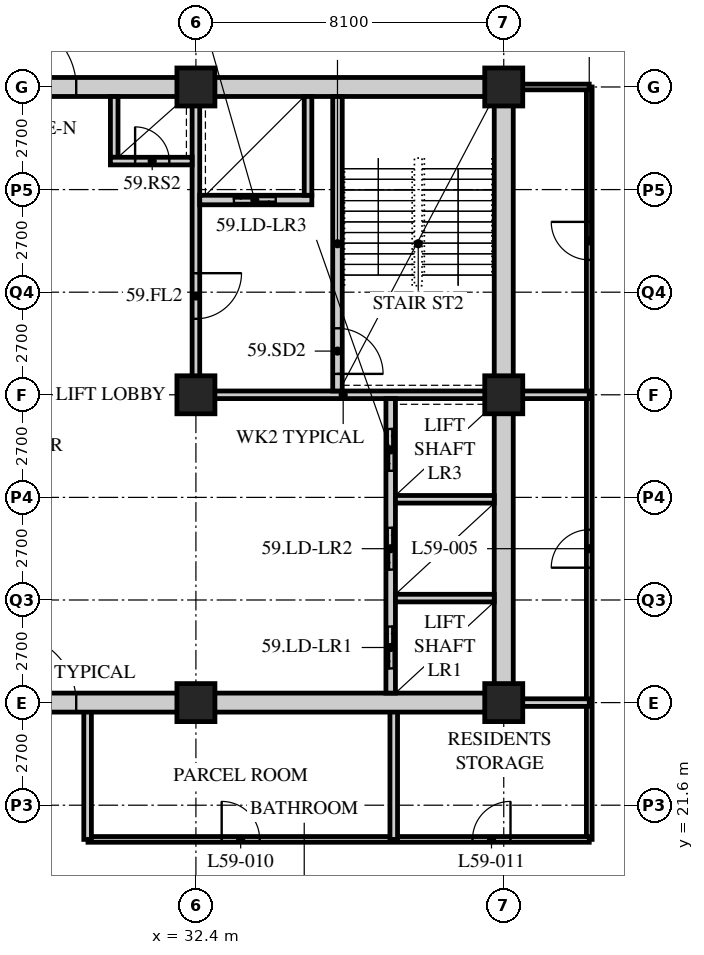
"""IFC4 building model, lengths in metres.
Left out: names, types, materials, properties, quantities, classifications, styles, units other than length and angle.
Written with IfcOpenShell. Run it as: python <this file> out.ifc"""

import sys

from ifc_helpers import new_model, si_unit, direction, frame, frame_2d, origin, origin_2d, place, context, subcontext, project, spatial, rectangle, hollow_rectangle, extrude, element, fill, save


model = new_model("IFC4")
c1 = context("Model", 3, precision=1e-05, world=origin(), true_north=direction((0.0, 1.0)))
c2 = subcontext(c1, "Body", "Model", "MODEL_VIEW")
j1 = project(units=[si_unit("LENGTHUNIT", "METRE"), si_unit("PLANEANGLEUNIT", "RADIAN")], contexts=[c1])
p1 = place(None, origin())
s1 = spatial("IfcSite", under=j1, at=p1, CompositionType="ELEMENT")
p2 = place(p1, origin())
s2 = spatial("IfcBuilding", under=s1, at=p2, CompositionType="ELEMENT")
p3 = place(p2, frame((0.0, 0.0, 228.0)))
s3 = spatial("IfcBuildingStorey", under=s2, at=p3, CompositionType="ELEMENT", Elevation=228.0)
for number, where, z_axis, x_axis in (
    (1, (32.4, 24.3, 0.0), (0.0, 0.0, 1.0), (1.0, 0.0, 0.0)),
    (2, (32.4, 32.4, 0.0), (0.0, 0.0, 1.0), (1.0, 0.0, 0.0)),
    (3, (32.4, 40.5, 0.0), (0.0, 0.0, 1.0), (1.0, 0.0, 0.0)),
    (4, (40.5, 24.3, 0.0), (0.0, 0.0, 1.0), (1.0, 0.0, 0.0)),
    (5, (40.5, 32.4, 0.0), (0.0, 0.0, 1.0), (1.0, 0.0, 0.0)),
    (6, (40.5, 40.5, 0.0), (0.0, 0.0, 1.0), (1.0, 0.0, 0.0)),
):
    element("IfcColumn", number, at=place(p3, frame(where, z_axis=z_axis, x_axis=x_axis)), inside=s3, PredefinedType="COLUMN", context=c2, shape_type="SweptSolid", body=[
        extrude(hollow_rectangle(XDim=1.0, YDim=1.0, WallThickness=0.1, at=origin_2d()), origin(), (0.0, 0.0, 1.0), 3.6),
    ])
p4 = place(p3, frame((42.75, 20.7, 0.0), z_axis=(0.0, 0.0, 1.0), x_axis=(0.0, 1.0, 0.0)))
e7 = element("IfcWall", 7, at=p4, inside=s3, PredefinedType="PARTITIONING", context=c2, shape_type="SweptSolid", body=[
    extrude(rectangle(XDim=19.8, YDim=0.15, at=frame_2d((9.9, 0.0))), origin(), (0.0, 0.0, 1.0), 3.39),
])
p5 = place(p4, frame((7.15, 0.0, 0.0)))
e8 = element("IfcOpeningElement", 8, at=p5, cuts=e7, PredefinedType="OPENING", context=c2, shape_type="SweptSolid", body=[
    extrude(rectangle(XDim=1.0, YDim=2.1, at=frame_2d((0.5, 1.05))), frame((0.0, 0.085, 0.0), z_axis=(0.0, -1.0, 0.0), x_axis=(1.0, 0.0, 0.0)), (0.0, 0.0, 1.0), 0.17),
])
p6 = place(p4, frame((15.25, 0.0, 0.0)))
e9 = element("IfcOpeningElement", 9, at=p6, cuts=e7, PredefinedType="OPENING", context=c2, shape_type="SweptSolid", body=[
    extrude(rectangle(XDim=1.0, YDim=2.1, at=frame_2d((0.5, 1.05))), frame((0.0, 0.085, 0.0), z_axis=(0.0, -1.0, 0.0), x_axis=(1.0, 0.0, 0.0)), (0.0, 0.0, 1.0), 0.17),
])
p7 = place(p3, frame((42.75, 40.5, 0.0), z_axis=(0.0, 0.0, 1.0), x_axis=(-1.0, 0.0, 0.0)))
e10 = element("IfcWall", 10, at=p7, inside=s3, PredefinedType="PARTITIONING", context=c2, shape_type="SweptSolid", body=[
    extrude(rectangle(XDim=2.05, YDim=0.15, at=frame_2d((1.025, 0.0))), origin(), (0.0, 0.0, 1.0), 3.39),
])
p8 = place(p3, frame((29.56, 20.7, 0.0), z_axis=(0.0, 0.0, 1.0), x_axis=(1.0, 0.0, 0.0)))
e11 = element("IfcWall", 11, at=p8, inside=s3, PredefinedType="PARTITIONING", context=c2, shape_type="SweptSolid", body=[
    extrude(rectangle(XDim=13.19, YDim=0.15, at=frame_2d((6.595, 0.0))), origin(), (0.0, 0.0, 1.0), 3.39),
])
p9 = place(p8, frame((3.518, 0.0, 0.0)))
e12 = element("IfcOpeningElement", 12, at=p9, cuts=e11, PredefinedType="OPENING", context=c2, shape_type="SweptSolid", body=[
    extrude(rectangle(XDim=1.0, YDim=2.1, at=frame_2d((0.5, 1.05))), frame((0.0, 0.085, 0.0), z_axis=(0.0, -1.0, 0.0), x_axis=(1.0, 0.0, 0.0)), (0.0, 0.0, 1.0), 0.17),
])
p10 = place(p8, frame((10.118, 0.0, 0.0)))
e13 = element("IfcOpeningElement", 13, at=p10, cuts=e11, PredefinedType="OPENING", context=c2, shape_type="SweptSolid", body=[
    extrude(rectangle(XDim=1.0, YDim=2.1, at=frame_2d((0.5, 1.05))), frame((0.0, 0.085, 0.0), z_axis=(0.0, -1.0, 0.0), x_axis=(1.0, 0.0, 0.0)), (0.0, 0.0, 1.0), 0.17),
])
p11 = place(p3, frame((40.5, 32.4, 0.0), z_axis=(0.0, 0.0, 1.0), x_axis=(1.0, 0.0, 0.0)))
e14 = element("IfcWall", 14, at=p11, inside=s3, PredefinedType="SOLIDWALL", context=c2, shape_type="SweptSolid", body=[
    extrude(rectangle(XDim=2.25, YDim=0.2, at=frame_2d((1.125, 0.0))), origin(), (0.0, 0.0, 1.0), 3.39),
])
for number, where, z_axis, x_axis in (
    (15, (37.606, 20.7, 0.0), (0.0, 0.0, 1.0), (0.0, 1.0, 0.0)),
    (16, (29.55, 20.7, 0.0), (0.0, 0.0, 1.0), (0.0, 1.0, 0.0)),
):
    element("IfcWall", number, at=place(p3, frame(where, z_axis=z_axis, x_axis=x_axis)), inside=s3, PredefinedType="SOLIDWALL", context=c2, shape_type="SweptSolid", body=[
        extrude(rectangle(XDim=3.6, YDim=0.2, at=frame_2d((1.8, 0.0))), origin(), (0.0, 0.0, 1.0), 3.39),
    ])
p12 = place(p3, frame((40.5, 24.3, 0.0), z_axis=(0.0, 0.0, 1.0), x_axis=(1.0, 0.0, 0.0)))
e17 = element("IfcWall", 17, at=p12, inside=s3, PredefinedType="SOLIDWALL", context=c2, shape_type="SweptSolid", body=[
    extrude(rectangle(XDim=2.25, YDim=0.2, at=frame_2d((1.125, 0.0))), origin(), (0.0, 0.0, 1.0), 3.39),
])
p13 = place(p3, frame((15.95, 24.3, 0.0), z_axis=(0.0, 0.0, 1.0), x_axis=(1.0, 0.0, 0.0)))
e18 = element("IfcWall", 18, at=p13, inside=s3, PredefinedType="SOLIDWALL", context=c2, shape_type="SweptSolid", body=[
    extrude(rectangle(XDim=24.8, YDim=0.5, at=frame_2d((12.4, 0.0))), origin(), (0.0, 0.0, 1.0), 2.628),
])
p14 = place(p13, frame((11.5, 0.0, 0.0)))
e19 = element("IfcOpeningElement", 19, at=p14, cuts=e18, PredefinedType="OPENING", context=c2, shape_type="SweptSolid", body=[
    extrude(rectangle(XDim=1.8, YDim=2.4, at=frame_2d((0.9, 1.2))), frame((0.0, 0.26, 0.0), z_axis=(0.0, -1.0, 0.0), x_axis=(1.0, 0.0, 0.0)), (0.0, 0.0, 1.0), 0.52),
])
p15 = place(p3, frame((15.95, 40.5, 0.0), z_axis=(0.0, 0.0, 1.0), x_axis=(1.0, 0.0, 0.0)))
e20 = element("IfcWall", 20, at=p15, inside=s3, PredefinedType="SOLIDWALL", context=c2, shape_type="SweptSolid", body=[
    extrude(rectangle(XDim=24.8, YDim=0.5, at=frame_2d((12.4, 0.0))), origin(), (0.0, 0.0, 1.0), 2.628),
])
p16 = place(p15, frame((11.5, 0.0, 0.0)))
e21 = element("IfcOpeningElement", 21, at=p16, cuts=e20, PredefinedType="OPENING", context=c2, shape_type="SweptSolid", body=[
    extrude(rectangle(XDim=1.8, YDim=2.4, at=frame_2d((0.9, 1.2))), frame((0.0, 0.26, 0.0), z_axis=(0.0, -1.0, 0.0), x_axis=(1.0, 0.0, 0.0)), (0.0, 0.0, 1.0), 0.52),
])
p17 = place(p3, frame((40.5, 24.55, 0.0), z_axis=(0.0, 0.0, 1.0), x_axis=(0.0, 1.0, 0.0)))
e22 = element("IfcWall", 22, at=p17, inside=s3, PredefinedType="SOLIDWALL", context=c2, shape_type="SweptSolid", body=[
    extrude(rectangle(XDim=15.7, YDim=0.5, at=frame_2d((7.85, 0.0))), origin(), (0.0, 0.0, 1.0), 2.628),
])
p18 = place(p3, frame((32.3, 32.4, 0.0), z_axis=(0.0, 0.0, 1.0), x_axis=(1.0, 0.0, 0.0)))
e23 = element("IfcWall", 23, at=p18, inside=s3, PredefinedType="SOLIDWALL", context=c2, shape_type="SweptSolid", body=[
    extrude(rectangle(XDim=7.95, YDim=0.2, at=frame_2d((3.975, 0.0))), origin(), (0.0, 0.0, 1.0), 2.778),
])
p19 = place(p3, frame((32.4, 32.5, 0.0), z_axis=(0.0, 0.0, 1.0), x_axis=(0.0, 1.0, 0.0)))
e24 = element("IfcWall", 24, at=p19, inside=s3, PredefinedType="SOLIDWALL", context=c2, shape_type="SweptSolid", body=[
    extrude(rectangle(XDim=7.75, YDim=0.2, at=frame_2d((3.875, 0.0))), origin(), (0.0, 0.0, 1.0), 2.778),
])
p20 = place(p19, frame((1.9, 0.0, 0.0)))
e25 = element("IfcOpeningElement", 25, at=p20, cuts=e24, PredefinedType="OPENING", context=c2, shape_type="SweptSolid", body=[
    extrude(rectangle(XDim=1.2, YDim=2.1, at=frame_2d((0.6, 1.05))), frame((0.0, 0.11, 0.0), z_axis=(0.0, -1.0, 0.0), x_axis=(1.0, 0.0, 0.0)), (0.0, 0.0, 1.0), 0.22),
])
p21 = place(p3, frame((37.525, 24.55, 0.0), z_axis=(0.0, 0.0, 1.0), x_axis=(0.0, 1.0, 0.0)))
e26 = element("IfcWall", 26, at=p21, inside=s3, PredefinedType="SOLIDWALL", context=c2, shape_type="SweptSolid", body=[
    extrude(rectangle(XDim=7.75, YDim=0.25, at=frame_2d((3.875, 0.0))), origin(), (0.0, 0.0, 1.0), 3.39),
])
p22 = place(p21, frame((0.65, 0.0, 0.0)))
e27 = element("IfcOpeningElement", 27, at=p22, cuts=e26, PredefinedType="OPENING", context=c2, shape_type="SweptSolid", body=[
    extrude(rectangle(XDim=1.1, YDim=2.4, at=frame_2d((0.55, 1.2))), frame((0.0, 0.135, 0.0), z_axis=(0.0, -1.0, 0.0), x_axis=(1.0, 0.0, 0.0)), (0.0, 0.0, 1.0), 0.27),
])
p23 = place(p21, frame((3.25, 0.0, 0.0)))
e28 = element("IfcOpeningElement", 28, at=p23, cuts=e26, PredefinedType="OPENING", context=c2, shape_type="SweptSolid", body=[
    extrude(rectangle(XDim=1.1, YDim=2.4, at=frame_2d((0.55, 1.2))), frame((0.0, 0.135, 0.0), z_axis=(0.0, -1.0, 0.0), x_axis=(1.0, 0.0, 0.0)), (0.0, 0.0, 1.0), 0.27),
])
p24 = place(p21, frame((5.85, 0.0, 0.0)))
e29 = element("IfcOpeningElement", 29, at=p24, cuts=e26, PredefinedType="OPENING", context=c2, shape_type="SweptSolid", body=[
    extrude(rectangle(XDim=1.1, YDim=2.4, at=frame_2d((0.55, 1.2))), frame((0.0, 0.135, 0.0), z_axis=(0.0, -1.0, 0.0), x_axis=(1.0, 0.0, 0.0)), (0.0, 0.0, 1.0), 0.27),
])
for number, where, z_axis, x_axis in (
    (30, (37.65, 27.05, 0.0), (0.0, 0.0, 1.0), (1.0, 0.0, 0.0)),
    (31, (37.65, 29.65, 0.0), (0.0, 0.0, 1.0), (1.0, 0.0, 0.0)),
):
    element("IfcWall", number, at=place(p3, frame(where, z_axis=z_axis, x_axis=x_axis)), inside=s3, PredefinedType="SOLIDWALL", context=c2, shape_type="SweptSolid", body=[
        extrude(rectangle(XDim=2.6, YDim=0.2, at=frame_2d((1.3, 0.0))), origin(), (0.0, 0.0, 1.0), 3.39),
    ])
p25 = place(p3, frame((36.125, 32.5, 0.0), z_axis=(0.0, 0.0, 1.0), x_axis=(0.0, 1.0, 0.0)))
e32 = element("IfcWall", 32, at=p25, inside=s3, PredefinedType="SOLIDWALL", context=c2, shape_type="SweptSolid", body=[
    extrude(rectangle(XDim=7.75, YDim=0.25, at=frame_2d((3.875, 0.0))), origin(), (0.0, 0.0, 1.0), 3.39),
])
p26 = place(p25, frame((0.45, 0.0, 0.0)))
e33 = element("IfcOpeningElement", 33, at=p26, cuts=e32, PredefinedType="OPENING", context=c2, shape_type="SweptSolid", body=[
    extrude(rectangle(XDim=1.2, YDim=2.1, at=frame_2d((0.6, 1.05))), frame((0.0, 0.135, 0.0), z_axis=(0.0, -1.0, 0.0), x_axis=(1.0, 0.0, 0.0)), (0.0, 0.0, 1.0), 0.27),
])
p27 = place(p3, frame((32.5, 37.525, 0.0), z_axis=(0.0, 0.0, 1.0), x_axis=(1.0, 0.0, 0.0)))
e34 = element("IfcWall", 34, at=p27, inside=s3, PredefinedType="SOLIDWALL", context=c2, shape_type="SweptSolid", body=[
    extrude(rectangle(XDim=2.95, YDim=0.25, at=frame_2d((1.475, 0.0))), origin(), (0.0, 0.0, 1.0), 3.39),
])
p28 = place(p27, frame((0.9, 0.0, 0.0)))
e35 = element("IfcOpeningElement", 35, at=p28, cuts=e34, PredefinedType="OPENING", context=c2, shape_type="SweptSolid", body=[
    extrude(rectangle(XDim=1.1, YDim=2.4, at=frame_2d((0.55, 1.2))), frame((0.0, 0.135, 0.0), z_axis=(0.0, -1.0, 0.0), x_axis=(1.0, 0.0, 0.0)), (0.0, 0.0, 1.0), 0.27),
])
p29 = place(p3, frame((35.35, 37.65, 0.0), z_axis=(0.0, 0.0, 1.0), x_axis=(0.0, 1.0, 0.0)))
e36 = element("IfcWall", 36, at=p29, inside=s3, PredefinedType="SOLIDWALL", context=c2, shape_type="SweptSolid", body=[
    extrude(rectangle(XDim=2.6, YDim=0.2, at=frame_2d((1.3, 0.0))), origin(), (0.0, 0.0, 1.0), 3.39),
])
p30 = place(p3, frame((30.25, 38.65, 0.0), z_axis=(0.0, 0.0, 1.0), x_axis=(0.0, 1.0, 0.0)))
e37 = element("IfcWall", 37, at=p30, inside=s3, PredefinedType="SOLIDWALL", context=c2, shape_type="SweptSolid", body=[
    extrude(rectangle(XDim=1.6, YDim=0.2, at=frame_2d((0.8, 0.0))), origin(), (0.0, 0.0, 1.0), 3.39),
])
p31 = place(p3, frame((30.15, 38.55, 0.0), z_axis=(0.0, 0.0, 1.0), x_axis=(1.0, 0.0, 0.0)))
e38 = element("IfcWall", 38, at=p31, inside=s3, PredefinedType="SOLIDWALL", context=c2, shape_type="SweptSolid", body=[
    extrude(rectangle(XDim=2.15, YDim=0.2, at=frame_2d((1.075, 0.0))), origin(), (0.0, 0.0, 1.0), 3.39),
])
p32 = place(p31, frame((0.65, 0.0, 0.0)))
e39 = element("IfcOpeningElement", 39, at=p32, cuts=e38, PredefinedType="OPENING", context=c2, shape_type="SweptSolid", body=[
    extrude(rectangle(XDim=0.9, YDim=2.1, at=frame_2d((0.45, 1.05))), frame((0.0, 0.11, 0.0), z_axis=(0.0, -1.0, 0.0), x_axis=(1.0, 0.0, 0.0)), (0.0, 0.0, 1.0), 0.22),
])
p33 = place(p5, origin())
e40 = element("IfcDoor", 40, at=p33, inside=s3, OperationType="SINGLE_SWING_LEFT", PredefinedType="DOOR", context=c2, shape_type="SweptSolid", body=[
    extrude(rectangle(XDim=1.0, YDim=2.1, at=frame_2d((0.5, 1.05))), frame((0.0, 0.025, 0.0), z_axis=(0.0, -1.0, 0.0), x_axis=(1.0, 0.0, 0.0)), (0.0, 0.0, 1.0), 0.05),
])
fill(e8, e40)
p34 = place(p6, origin())
e41 = element("IfcDoor", 41, at=p34, inside=s3, OperationType="SINGLE_SWING_RIGHT", PredefinedType="DOOR", context=c2, shape_type="SweptSolid", body=[
    extrude(rectangle(XDim=1.0, YDim=2.1, at=frame_2d((0.5, 1.05))), frame((0.0, 0.025, 0.0), z_axis=(0.0, -1.0, 0.0), x_axis=(1.0, 0.0, 0.0)), (0.0, 0.0, 1.0), 0.05),
])
fill(e9, e41)
p35 = place(p9, origin())
e42 = element("IfcDoor", 42, at=p35, inside=s3, OperationType="SINGLE_SWING_LEFT", PredefinedType="DOOR", context=c2, shape_type="SweptSolid", body=[
    extrude(rectangle(XDim=1.0, YDim=2.1, at=frame_2d((0.5, 1.05))), frame((0.0, 0.025, 0.0), z_axis=(0.0, -1.0, 0.0), x_axis=(1.0, 0.0, 0.0)), (0.0, 0.0, 1.0), 0.05),
])
fill(e12, e42)
p36 = place(p10, origin())
e43 = element("IfcDoor", 43, at=p36, inside=s3, OperationType="SINGLE_SWING_RIGHT", PredefinedType="DOOR", context=c2, shape_type="SweptSolid", body=[
    extrude(rectangle(XDim=1.0, YDim=2.1, at=frame_2d((0.5, 1.05))), frame((0.0, 0.025, 0.0), z_axis=(0.0, -1.0, 0.0), x_axis=(1.0, 0.0, 0.0)), (0.0, 0.0, 1.0), 0.05),
])
fill(e13, e43)
p37 = place(p26, origin())
e44 = element("IfcDoor", 44, at=p37, inside=s3, OperationType="SINGLE_SWING_RIGHT", PredefinedType="DOOR", context=c2, shape_type="SweptSolid", body=[
    extrude(rectangle(XDim=1.2, YDim=2.1, at=frame_2d((0.6, 1.05))), frame((0.0, 0.025, 0.0), z_axis=(0.0, -1.0, 0.0), x_axis=(1.0, 0.0, 0.0)), (0.0, 0.0, 1.0), 0.05),
])
fill(e33, e44)
p38 = place(p20, origin())
e45 = element("IfcDoor", 45, at=p38, inside=s3, OperationType="SINGLE_SWING_LEFT", PredefinedType="DOOR", context=c2, shape_type="SweptSolid", body=[
    extrude(rectangle(XDim=1.2, YDim=2.1, at=frame_2d((0.6, 1.05))), frame((0.0, 0.025, 0.0), z_axis=(0.0, -1.0, 0.0), x_axis=(1.0, 0.0, 0.0)), (0.0, 0.0, 1.0), 0.05),
])
fill(e25, e45)
p39 = place(p32, origin())
e46 = element("IfcDoor", 46, at=p39, inside=s3, OperationType="SINGLE_SWING_LEFT", PredefinedType="DOOR", context=c2, shape_type="SweptSolid", body=[
    extrude(rectangle(XDim=0.9, YDim=2.1, at=frame_2d((0.45, 1.05))), frame((0.0, 0.025, 0.0), z_axis=(0.0, -1.0, 0.0), x_axis=(1.0, 0.0, 0.0)), (0.0, 0.0, 1.0), 0.05),
])
fill(e39, e46)
p40 = place(p22, origin())
e47 = element("IfcDoor", 47, at=p40, inside=s3, OperationType="DOUBLE_DOOR_SLIDING", PredefinedType="DOOR", context=c2, shape_type="SweptSolid", body=[
    extrude(rectangle(XDim=1.1, YDim=2.4, at=frame_2d((0.55, 1.2))), frame((0.0, 0.025, 0.0), z_axis=(0.0, -1.0, 0.0), x_axis=(1.0, 0.0, 0.0)), (0.0, 0.0, 1.0), 0.05),
])
fill(e27, e47)
p41 = place(p23, origin())
e48 = element("IfcDoor", 48, at=p41, inside=s3, OperationType="DOUBLE_DOOR_SLIDING", PredefinedType="DOOR", context=c2, shape_type="SweptSolid", body=[
    extrude(rectangle(XDim=1.1, YDim=2.4, at=frame_2d((0.55, 1.2))), frame((0.0, 0.025, 0.0), z_axis=(0.0, -1.0, 0.0), x_axis=(1.0, 0.0, 0.0)), (0.0, 0.0, 1.0), 0.05),
])
fill(e28, e48)
p42 = place(p24, origin())
e49 = element("IfcDoor", 49, at=p42, inside=s3, OperationType="DOUBLE_DOOR_SLIDING", PredefinedType="DOOR", context=c2, shape_type="SweptSolid", body=[
    extrude(rectangle(XDim=1.1, YDim=2.4, at=frame_2d((0.55, 1.2))), frame((0.0, 0.025, 0.0), z_axis=(0.0, -1.0, 0.0), x_axis=(1.0, 0.0, 0.0)), (0.0, 0.0, 1.0), 0.05),
])
fill(e29, e49)
p43 = place(p28, origin())
e50 = element("IfcDoor", 50, at=p43, inside=s3, OperationType="DOUBLE_DOOR_SLIDING", PredefinedType="DOOR", context=c2, shape_type="SweptSolid", body=[
    extrude(rectangle(XDim=1.1, YDim=2.4, at=frame_2d((0.55, 1.2))), frame((0.0, 0.025, 0.0), z_axis=(0.0, -1.0, 0.0), x_axis=(1.0, 0.0, 0.0)), (0.0, 0.0, 1.0), 0.05),
])
fill(e35, e50)
p44 = place(p14, origin())
e51 = element("IfcDoor", 51, at=p44, inside=s3, OperationType="DOUBLE_DOOR_SINGLE_SWING", PredefinedType="DOOR", context=c2, shape_type="SweptSolid", body=[
    extrude(rectangle(XDim=1.8, YDim=2.4, at=frame_2d((0.9, 1.2))), frame((0.0, 0.025, 0.0), z_axis=(0.0, -1.0, 0.0), x_axis=(1.0, 0.0, 0.0)), (0.0, 0.0, 1.0), 0.05),
])
fill(e19, e51)
p45 = place(p16, origin())
e52 = element("IfcDoor", 52, at=p45, inside=s3, OperationType="DOUBLE_DOOR_SINGLE_SWING", PredefinedType="DOOR", context=c2, shape_type="SweptSolid", body=[
    extrude(rectangle(XDim=1.8, YDim=2.4, at=frame_2d((0.9, 1.2))), frame((0.0, 0.025, 0.0), z_axis=(0.0, -1.0, 0.0), x_axis=(1.0, 0.0, 0.0)), (0.0, 0.0, 1.0), 0.05),
])
fill(e21, e52)
save(model, sys.argv[1])
